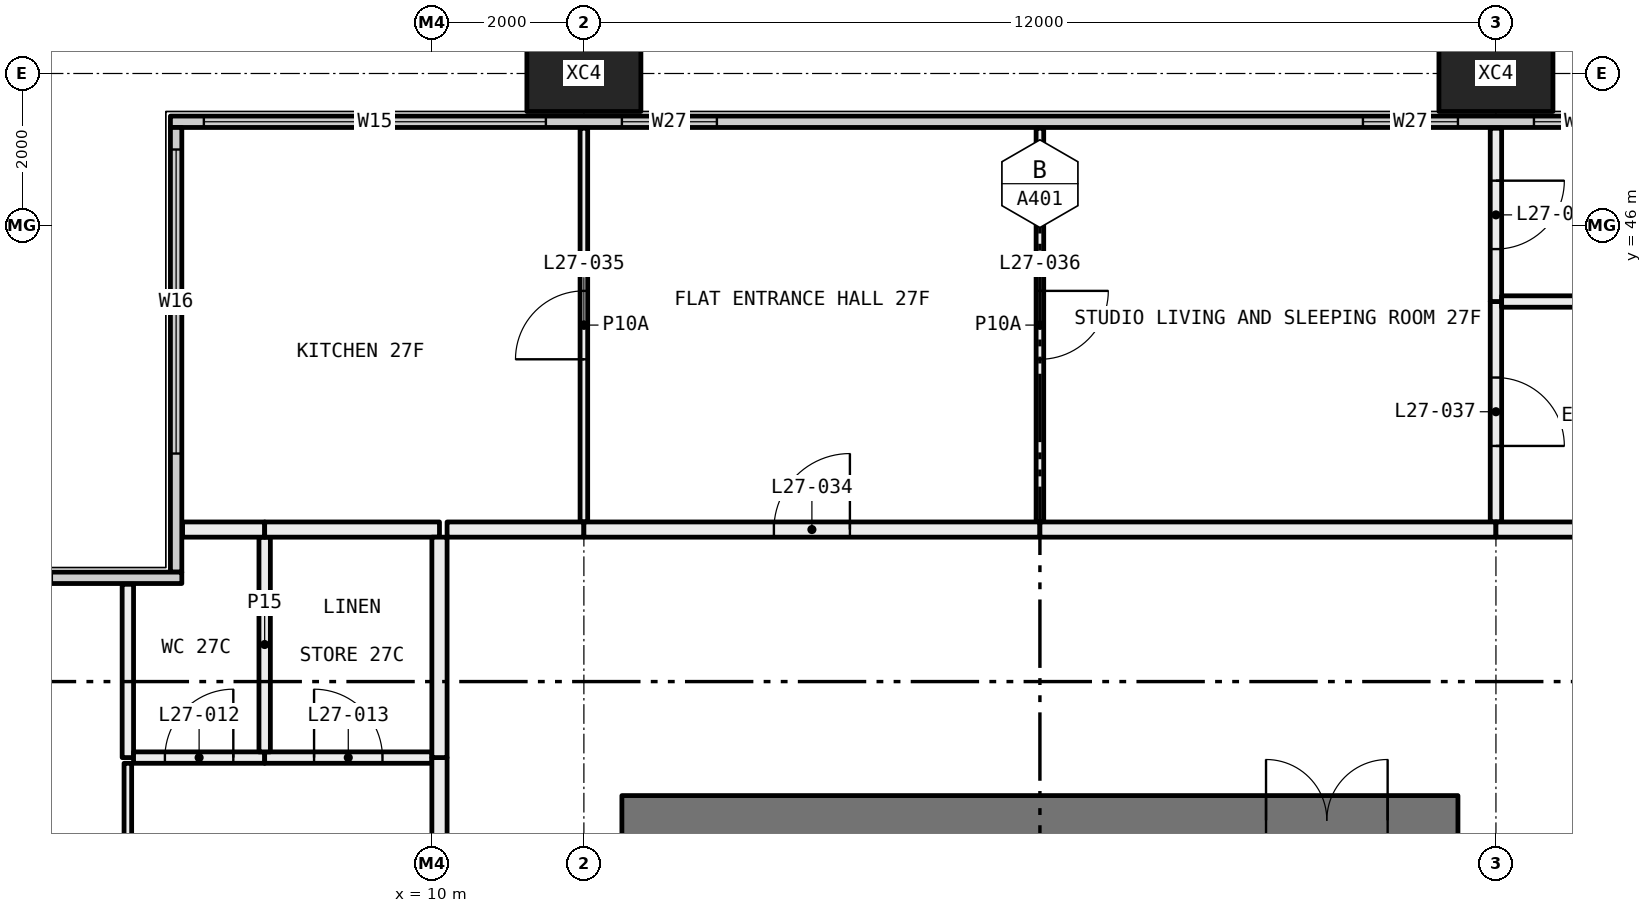
"""IFC4 building model, lengths in metres.
Left out: names, types, materials, properties, quantities, classifications, styles, units other than length and angle.
Written with IfcOpenShell. Run it as: python <this file> out.ifc"""

import sys

from ifc_helpers import new_model, si_unit, direction, frame, frame_2d, origin, origin_2d, place, context, subcontext, project, spatial, rectangle, hollow_rectangle, extrude, element, fill, save


model = new_model("IFC4")
c1 = context("Model", 3, precision=1e-05, world=origin(), true_north=direction((0.0, 1.0)))
c2 = subcontext(c1, "Body", "Model", "MODEL_VIEW")
j1 = project(units=[si_unit("LENGTHUNIT", "METRE"), si_unit("PLANEANGLEUNIT", "RADIAN")], contexts=[c1])
p1 = place(None, origin())
s1 = spatial("IfcSite", under=j1, at=p1, CompositionType="ELEMENT")
p2 = place(p1, origin())
s2 = spatial("IfcBuilding", under=s1, at=p2, CompositionType="ELEMENT")
p3 = place(p2, frame((0.0, 0.0, 106.95)))
s3 = spatial("IfcBuildingStorey", under=s2, at=p3, CompositionType="ELEMENT", Elevation=106.95)
for number, where, z_axis, x_axis in (
    (1, (12.0, 48.0, -0.4), (0.0, 0.0, 1.0), (1.0, 0.0, 0.0)),
    (2, (24.0, 48.0, -0.4), (0.0, 0.0, 1.0), (1.0, 0.0, 0.0)),
):
    element("IfcColumn", number, at=place(p3, frame(where, z_axis=z_axis, x_axis=x_axis)), inside=s3, PredefinedType="COLUMN", context=c2, shape_type="SweptSolid", body=[
        extrude(hollow_rectangle(XDim=1.5, YDim=1.0, WallThickness=0.06, at=origin_2d()), origin(), (0.0, 0.0, 1.0), 3.45),
    ])
p4 = place(p3, frame((6.56, 47.365, 0.0), z_axis=(0.0, 0.0, 1.0), x_axis=(1.0, 0.0, 0.0)))
e3 = element("IfcWall", 3, at=p4, inside=s3, PredefinedType="ELEMENTEDWALL", context=c2, shape_type="SweptSolid", body=[
    extrude(rectangle(XDim=58.88, YDim=0.15, at=frame_2d((29.44, 0.0))), origin(), (0.0, 0.0, 1.0), 3.05),
])
p5 = place(p4, frame((0.44, 0.0, 0.45)))
e4 = element("IfcOpeningElement", 4, at=p5, cuts=e3, PredefinedType="OPENING", context=c2, shape_type="SweptSolid", body=[
    extrude(rectangle(XDim=4.5, YDim=2.55, at=frame_2d((2.25, 1.275))), frame((0.0, 0.085, 0.0), z_axis=(0.0, -1.0, 0.0), x_axis=(1.0, 0.0, 0.0)), (0.0, 0.0, 1.0), 0.17),
])
p6 = place(p4, frame((5.94, 0.0, 0.45)))
e5 = element("IfcOpeningElement", 5, at=p6, cuts=e3, PredefinedType="OPENING", context=c2, shape_type="SweptSolid", body=[
    extrude(rectangle(XDim=1.25, YDim=2.55, at=frame_2d((0.625, 1.275))), frame((0.0, 0.085, 0.0), z_axis=(0.0, -1.0, 0.0), x_axis=(1.0, 0.0, 0.0)), (0.0, 0.0, 1.0), 0.17),
])
p7 = place(p4, frame((15.69, 0.0, 0.45)))
e6 = element("IfcOpeningElement", 6, at=p7, cuts=e3, PredefinedType="OPENING", context=c2, shape_type="SweptSolid", body=[
    extrude(rectangle(XDim=1.25, YDim=2.55, at=frame_2d((0.625, 1.275))), frame((0.0, 0.085, 0.0), z_axis=(0.0, -1.0, 0.0), x_axis=(1.0, 0.0, 0.0)), (0.0, 0.0, 1.0), 0.17),
])
p8 = place(p4, frame((17.94, 0.0, 0.45)))
e7 = element("IfcOpeningElement", 7, at=p8, cuts=e3, PredefinedType="OPENING", context=c2, shape_type="SweptSolid", body=[
    extrude(rectangle(XDim=1.25, YDim=2.55, at=frame_2d((0.625, 1.275))), frame((0.0, 0.085, 0.0), z_axis=(0.0, -1.0, 0.0), x_axis=(1.0, 0.0, 0.0)), (0.0, 0.0, 1.0), 0.17),
])
p9 = place(p4, frame((27.69, 0.0, 0.45)))
e8 = element("IfcOpeningElement", 8, at=p9, cuts=e3, PredefinedType="OPENING", context=c2, shape_type="SweptSolid", body=[
    extrude(rectangle(XDim=1.25, YDim=2.55, at=frame_2d((0.625, 1.275))), frame((0.0, 0.085, 0.0), z_axis=(0.0, -1.0, 0.0), x_axis=(1.0, 0.0, 0.0)), (0.0, 0.0, 1.0), 0.17),
])
p10 = place(p4, frame((29.94, 0.0, 0.45)))
e9 = element("IfcOpeningElement", 9, at=p10, cuts=e3, PredefinedType="OPENING", context=c2, shape_type="SweptSolid", body=[
    extrude(rectangle(XDim=1.25, YDim=2.55, at=frame_2d((0.625, 1.275))), frame((0.0, 0.085, 0.0), z_axis=(0.0, -1.0, 0.0), x_axis=(1.0, 0.0, 0.0)), (0.0, 0.0, 1.0), 0.17),
])
p11 = place(p4, frame((39.69, 0.0, 0.45)))
e10 = element("IfcOpeningElement", 10, at=p11, cuts=e3, PredefinedType="OPENING", context=c2, shape_type="SweptSolid", body=[
    extrude(rectangle(XDim=1.25, YDim=2.55, at=frame_2d((0.625, 1.275))), frame((0.0, 0.085, 0.0), z_axis=(0.0, -1.0, 0.0), x_axis=(1.0, 0.0, 0.0)), (0.0, 0.0, 1.0), 0.17),
])
p12 = place(p4, frame((41.94, 0.0, 0.45)))
e11 = element("IfcOpeningElement", 11, at=p12, cuts=e3, PredefinedType="OPENING", context=c2, shape_type="SweptSolid", body=[
    extrude(rectangle(XDim=1.25, YDim=2.55, at=frame_2d((0.625, 1.275))), frame((0.0, 0.085, 0.0), z_axis=(0.0, -1.0, 0.0), x_axis=(1.0, 0.0, 0.0)), (0.0, 0.0, 1.0), 0.17),
])
p13 = place(p4, frame((51.69, 0.0, 0.45)))
e12 = element("IfcOpeningElement", 12, at=p13, cuts=e3, PredefinedType="OPENING", context=c2, shape_type="SweptSolid", body=[
    extrude(rectangle(XDim=1.25, YDim=2.55, at=frame_2d((0.625, 1.275))), frame((0.0, 0.085, 0.0), z_axis=(0.0, -1.0, 0.0), x_axis=(1.0, 0.0, 0.0)), (0.0, 0.0, 1.0), 0.17),
])
p14 = place(p4, frame((53.94, 0.0, 0.45)))
e13 = element("IfcOpeningElement", 13, at=p14, cuts=e3, PredefinedType="OPENING", context=c2, shape_type="SweptSolid", body=[
    extrude(rectangle(XDim=4.5, YDim=2.55, at=frame_2d((2.25, 1.275))), frame((0.0, 0.085, 0.0), z_axis=(0.0, -1.0, 0.0), x_axis=(1.0, 0.0, 0.0)), (0.0, 0.0, 1.0), 0.17),
])
p15 = place(p3, frame((6.635, 41.44, 0.0), z_axis=(0.0, 0.0, 1.0), x_axis=(0.0, 1.0, 0.0)))
e14 = element("IfcWall", 14, at=p15, inside=s3, PredefinedType="ELEMENTEDWALL", context=c2, shape_type="SweptSolid", body=[
    extrude(rectangle(XDim=5.85, YDim=0.15, at=frame_2d((2.925, 0.0))), origin(), (0.0, 0.0, 1.0), 3.05),
])
p16 = place(p15, frame((1.56, 0.0, 0.45)))
e15 = element("IfcOpeningElement", 15, at=p16, cuts=e14, PredefinedType="OPENING", context=c2, shape_type="SweptSolid", body=[
    extrude(rectangle(XDim=4.0, YDim=2.55, at=frame_2d((2.0, 1.275))), frame((0.0, 0.085, 0.0), z_axis=(0.0, -1.0, 0.0), x_axis=(1.0, 0.0, 0.0)), (0.0, 0.0, 1.0), 0.17),
])
p17 = place(p3, frame((0.56, 41.365, 0.0), z_axis=(0.0, 0.0, 1.0), x_axis=(1.0, 0.0, 0.0)))
e16 = element("IfcWall", 16, at=p17, inside=s3, PredefinedType="ELEMENTEDWALL", context=c2, shape_type="SweptSolid", body=[
    extrude(rectangle(XDim=6.15, YDim=0.15, at=frame_2d((3.075, 0.0))), origin(), (0.0, 0.0, 1.0), 3.05),
])
p18 = place(p17, frame((0.44, 0.0, 0.45)))
e17 = element("IfcOpeningElement", 17, at=p18, cuts=e16, PredefinedType="OPENING", context=c2, shape_type="SweptSolid", body=[
    extrude(rectangle(XDim=4.0, YDim=2.55, at=frame_2d((2.0, 1.275))), frame((0.0, 0.085, 0.0), z_axis=(0.0, -1.0, 0.0), x_axis=(1.0, 0.0, 0.0)), (0.0, 0.0, 1.0), 0.17),
])
p19 = place(p3, frame((6.0, 36.05, 0.0), z_axis=(0.0, 0.0, 1.0), x_axis=(0.0, 1.0, 0.0)))
e18 = element("IfcWall", 18, at=p19, inside=s3, PredefinedType="PARTITIONING", context=c2, shape_type="SweptSolid", body=[
    extrude(rectangle(XDim=2.875, YDim=0.1, at=frame_2d((1.438, 0.0))), origin(), (0.0, 0.0, 1.0), 2.45),
])
p20 = place(p3, frame((6.0, 39.0, 0.0), z_axis=(0.0, 0.0, 1.0), x_axis=(0.0, 1.0, 0.0)))
e19 = element("IfcWall", 19, at=p20, inside=s3, PredefinedType="PARTITIONING", context=c2, shape_type="SweptSolid", body=[
    extrude(rectangle(XDim=2.28, YDim=0.15, at=frame_2d((1.14, 0.0))), origin(), (0.0, 0.0, 1.0), 3.05),
])
p21 = place(p3, frame((7.8, 39.0, 0.0), z_axis=(0.0, 0.0, 1.0), x_axis=(-1.0, 0.0, 0.0)))
e20 = element("IfcWall", 20, at=p21, inside=s3, PredefinedType="PARTITIONING", context=c2, shape_type="SweptSolid", body=[
    extrude(rectangle(XDim=1.725, YDim=0.15, at=frame_2d((0.863, 0.0))), origin(), (0.0, 0.0, 1.0), 3.05),
])
p22 = place(p21, frame((0.413, 0.0, 0.0)))
e21 = element("IfcOpeningElement", 21, at=p22, cuts=e20, PredefinedType="OPENING", context=c2, shape_type="SweptSolid", body=[
    extrude(rectangle(XDim=0.9, YDim=2.1, at=frame_2d((0.45, 1.05))), frame((0.0, 0.085, 0.0), z_axis=(0.0, -1.0, 0.0), x_axis=(1.0, 0.0, 0.0)), (0.0, 0.0, 1.0), 0.17),
])
p23 = place(p3, frame((10.0, 39.0, 0.0), z_axis=(0.0, 0.0, 1.0), x_axis=(-1.0, 0.0, 0.0)))
e22 = element("IfcWall", 22, at=p23, inside=s3, PredefinedType="PARTITIONING", context=c2, shape_type="SweptSolid", body=[
    extrude(rectangle(XDim=2.2, YDim=0.15, at=frame_2d((1.1, 0.0))), origin(), (0.0, 0.0, 1.0), 3.05),
])
p24 = place(p23, frame((0.65, 0.0, 0.0)))
e23 = element("IfcOpeningElement", 23, at=p24, cuts=e22, PredefinedType="OPENING", context=c2, shape_type="SweptSolid", body=[
    extrude(rectangle(XDim=0.9, YDim=2.1, at=frame_2d((0.45, 1.05))), frame((0.0, 0.085, 0.0), z_axis=(0.0, -1.0, 0.0), x_axis=(1.0, 0.0, 0.0)), (0.0, 0.0, 1.0), 0.17),
])
p25 = place(p3, frame((10.1, 36.1, 0.0), z_axis=(0.0, 0.0, 1.0), x_axis=(0.0, 1.0, 0.0)))
e24 = element("IfcWall", 24, at=p25, inside=s3, PredefinedType="PARTITIONING", context=c2, shape_type="SweptSolid", body=[
    extrude(rectangle(XDim=2.9, YDim=0.2, at=frame_2d((1.45, 0.0))), origin(), (0.0, 0.0, 1.0), 3.05),
])
p26 = place(p3, frame((7.8, 39.075, 0.0), z_axis=(0.0, 0.0, 1.0), x_axis=(0.0, 1.0, 0.0)))
e25 = element("IfcWall", 25, at=p26, inside=s3, PredefinedType="PARTITIONING", context=c2, shape_type="SweptSolid", body=[
    extrude(rectangle(XDim=2.825, YDim=0.15, at=frame_2d((1.413, 0.0))), origin(), (0.0, 0.0, 1.0), 3.05),
])
p27 = place(p3, frame((7.8, 42.0, 0.0), z_axis=(0.0, 0.0, 1.0), x_axis=(-1.0, 0.0, 0.0)))
e26 = element("IfcWall", 26, at=p27, inside=s3, PredefinedType="PARTITIONING", context=c2, shape_type="SweptSolid", body=[
    extrude(rectangle(XDim=1.08, YDim=0.2, at=frame_2d((0.54, 0.0))), origin(), (0.0, 0.0, 1.0), 3.05),
])
p28 = place(p3, frame((10.1, 42.0, 0.0), z_axis=(0.0, 0.0, 1.0), x_axis=(-1.0, 0.0, 0.0)))
e27 = element("IfcWall", 27, at=p28, inside=s3, PredefinedType="PARTITIONING", context=c2, shape_type="SweptSolid", body=[
    extrude(rectangle(XDim=2.3, YDim=0.2, at=frame_2d((1.15, 0.0))), origin(), (0.0, 0.0, 1.0), 3.05),
])
p29 = place(p3, frame((10.1, 39.0, 0.0), z_axis=(0.0, 0.0, 1.0), x_axis=(0.0, 1.0, 0.0)))
e28 = element("IfcWall", 28, at=p29, inside=s3, PredefinedType="PARTITIONING", context=c2, shape_type="SweptSolid", body=[
    extrude(rectangle(XDim=2.9, YDim=0.2, at=frame_2d((1.45, 0.0))), origin(), (0.0, 0.0, 1.0), 3.05),
])
p30 = place(p3, frame((12.0, 42.1, 0.0), z_axis=(0.0, 0.0, 1.0), x_axis=(0.0, 1.0, 0.0)))
e29 = element("IfcWall", 29, at=p30, inside=s3, PredefinedType="PARTITIONING", context=c2, shape_type="SweptSolid", body=[
    extrude(rectangle(XDim=5.18, YDim=0.1, at=frame_2d((2.59, 0.0))), origin(), (0.0, 0.0, 1.0), 3.05),
])
p31 = place(p30, frame((2.14, 0.0, 0.0)))
e30 = element("IfcOpeningElement", 30, at=p31, cuts=e29, PredefinedType="OPENING", context=c2, shape_type="SweptSolid", body=[
    extrude(rectangle(XDim=0.9, YDim=2.1, at=frame_2d((0.45, 1.05))), frame((0.0, 0.06, 0.0), z_axis=(0.0, -1.0, 0.0), x_axis=(1.0, 0.0, 0.0)), (0.0, 0.0, 1.0), 0.12),
])
p32 = place(p3, frame((10.2, 42.0, 0.0), z_axis=(0.0, 0.0, 1.0), x_axis=(1.0, 0.0, 0.0)))
e31 = element("IfcWall", 31, at=p32, inside=s3, PredefinedType="PARTITIONING", context=c2, shape_type="SweptSolid", body=[
    extrude(rectangle(XDim=1.8, YDim=0.2, at=frame_2d((0.9, 0.0))), origin(), (0.0, 0.0, 1.0), 3.05),
])
p33 = place(p3, frame((18.0, 42.1, 0.0), z_axis=(0.0, 0.0, 1.0), x_axis=(0.0, 1.0, 0.0)))
e32 = element("IfcWall", 32, at=p33, inside=s3, PredefinedType="PARTITIONING", context=c2, shape_type="SweptSolid", body=[
    extrude(rectangle(XDim=5.18, YDim=0.1, at=frame_2d((2.59, 0.0))), origin(), (0.0, 0.0, 1.0), 3.05),
])
p34 = place(p33, frame((2.14, 0.0, 0.0)))
e33 = element("IfcOpeningElement", 33, at=p34, cuts=e32, PredefinedType="OPENING", context=c2, shape_type="SweptSolid", body=[
    extrude(rectangle(XDim=0.9, YDim=2.1, at=frame_2d((0.45, 1.05))), frame((0.0, 0.06, 0.0), z_axis=(0.0, -1.0, 0.0), x_axis=(1.0, 0.0, 0.0)), (0.0, 0.0, 1.0), 0.12),
])
p35 = place(p3, frame((12.0, 42.0, 0.0), z_axis=(0.0, 0.0, 1.0), x_axis=(1.0, 0.0, 0.0)))
e34 = element("IfcWall", 34, at=p35, inside=s3, PredefinedType="PARTITIONING", context=c2, shape_type="SweptSolid", body=[
    extrude(rectangle(XDim=6.0, YDim=0.2, at=frame_2d((3.0, 0.0))), origin(), (0.0, 0.0, 1.0), 3.05),
])
p36 = place(p35, frame((2.5, 0.0, 0.0)))
e35 = element("IfcOpeningElement", 35, at=p36, cuts=e34, PredefinedType="OPENING", context=c2, shape_type="SweptSolid", body=[
    extrude(rectangle(XDim=1.0, YDim=2.1, at=frame_2d((0.5, 1.05))), frame((0.0, 0.11, 0.0), z_axis=(0.0, -1.0, 0.0), x_axis=(1.0, 0.0, 0.0)), (0.0, 0.0, 1.0), 0.22),
])
p37 = place(p3, frame((24.0, 42.1, 0.0), z_axis=(0.0, 0.0, 1.0), x_axis=(0.0, 1.0, 0.0)))
e36 = element("IfcWall", 36, at=p37, inside=s3, PredefinedType="PARTITIONING", context=c2, shape_type="SweptSolid", body=[
    extrude(rectangle(XDim=2.9, YDim=0.15, at=frame_2d((1.45, 0.0))), origin(), (0.0, 0.0, 1.0), 3.05),
])
p38 = place(p37, frame((1.0, 0.0, 0.0)))
e37 = element("IfcOpeningElement", 37, at=p38, cuts=e36, PredefinedType="OPENING", context=c2, shape_type="SweptSolid", body=[
    extrude(rectangle(XDim=0.9, YDim=2.1, at=frame_2d((0.45, 1.05))), frame((0.0, 0.085, 0.0), z_axis=(0.0, -1.0, 0.0), x_axis=(1.0, 0.0, 0.0)), (0.0, 0.0, 1.0), 0.17),
])
p39 = place(p3, frame((24.0, 45.0, 0.0), z_axis=(0.0, 0.0, 1.0), x_axis=(0.0, 1.0, 0.0)))
e38 = element("IfcWall", 38, at=p39, inside=s3, PredefinedType="PARTITIONING", context=c2, shape_type="SweptSolid", body=[
    extrude(rectangle(XDim=2.28, YDim=0.15, at=frame_2d((1.14, 0.0))), origin(), (0.0, 0.0, 1.0), 3.05),
])
p40 = place(p39, frame((0.69, 0.0, 0.0)))
e39 = element("IfcOpeningElement", 39, at=p40, cuts=e38, PredefinedType="OPENING", context=c2, shape_type="SweptSolid", body=[
    extrude(rectangle(XDim=0.9, YDim=2.1, at=frame_2d((0.45, 1.05))), frame((0.0, 0.085, 0.0), z_axis=(0.0, -1.0, 0.0), x_axis=(1.0, 0.0, 0.0)), (0.0, 0.0, 1.0), 0.17),
])
p41 = place(p3, frame((18.0, 42.0, 0.0), z_axis=(0.0, 0.0, 1.0), x_axis=(1.0, 0.0, 0.0)))
e40 = element("IfcWall", 40, at=p41, inside=s3, PredefinedType="PARTITIONING", context=c2, shape_type="SweptSolid", body=[
    extrude(rectangle(XDim=6.0, YDim=0.2, at=frame_2d((3.0, 0.0))), origin(), (0.0, 0.0, 1.0), 3.05),
])
p42 = place(p3, frame((29.9, 45.0, 0.0), z_axis=(0.0, 0.0, 1.0), x_axis=(-1.0, 0.0, 0.0)))
e41 = element("IfcWall", 41, at=p42, inside=s3, PredefinedType="PARTITIONING", context=c2, shape_type="SweptSolid", body=[
    extrude(rectangle(XDim=5.825, YDim=0.15, at=frame_2d((2.913, 0.0))), origin(), (0.0, 0.0, 1.0), 3.05),
])
p43 = place(p3, frame((24.0, 42.0, 0.0), z_axis=(0.0, 0.0, 1.0), x_axis=(1.0, 0.0, 0.0)))
e42 = element("IfcWall", 42, at=p43, inside=s3, PredefinedType="PARTITIONING", context=c2, shape_type="SweptSolid", body=[
    extrude(rectangle(XDim=1.9, YDim=0.2, at=frame_2d((0.95, 0.0))), origin(), (0.0, 0.0, 1.0), 3.05),
])
p44 = place(p3, frame((12.5, 38.175, 0.0), z_axis=(0.0, 0.0, 1.0), x_axis=(1.0, 0.0, 0.0)))
e43 = element("IfcWall", 43, at=p44, inside=s3, PredefinedType="SHEAR", context=c2, shape_type="SweptSolid", body=[
    extrude(rectangle(XDim=11.0, YDim=0.65, at=frame_2d((5.5, 0.0))), origin(), (0.0, 0.0, 1.0), 3.05),
])
p45 = place(p44, frame((8.475, 0.0, 0.0)))
e44 = element("IfcOpeningElement", 44, at=p45, cuts=e43, PredefinedType="OPENING", context=c2, shape_type="SweptSolid", body=[
    extrude(rectangle(XDim=1.6, YDim=2.1, at=frame_2d((0.8, 1.05))), frame((0.0, 0.335, 0.0), z_axis=(0.0, -1.0, 0.0), x_axis=(1.0, 0.0, 0.0)), (0.0, 0.0, 1.0), 0.67),
])
p46 = place(p5, origin())
e45 = element("IfcWindow", 45, at=p46, inside=s3, PartitioningType="SINGLE_PANEL", PredefinedType="WINDOW", context=c2, shape_type="SweptSolid", body=[
    extrude(rectangle(XDim=4.5, YDim=2.55, at=frame_2d((2.25, 1.275))), frame((0.0, 0.03, 0.0), z_axis=(0.0, -1.0, 0.0), x_axis=(1.0, 0.0, 0.0)), (0.0, 0.0, 1.0), 0.06),
])
fill(e4, e45)
p47 = place(p6, origin())
e46 = element("IfcWindow", 46, at=p47, inside=s3, PartitioningType="SINGLE_PANEL", PredefinedType="WINDOW", context=c2, shape_type="SweptSolid", body=[
    extrude(rectangle(XDim=1.25, YDim=2.55, at=frame_2d((0.625, 1.275))), frame((0.0, 0.03, 0.0), z_axis=(0.0, -1.0, 0.0), x_axis=(1.0, 0.0, 0.0)), (0.0, 0.0, 1.0), 0.06),
])
fill(e5, e46)
p48 = place(p7, origin())
e47 = element("IfcWindow", 47, at=p48, inside=s3, PartitioningType="SINGLE_PANEL", PredefinedType="WINDOW", context=c2, shape_type="SweptSolid", body=[
    extrude(rectangle(XDim=1.25, YDim=2.55, at=frame_2d((0.625, 1.275))), frame((0.0, 0.03, 0.0), z_axis=(0.0, -1.0, 0.0), x_axis=(1.0, 0.0, 0.0)), (0.0, 0.0, 1.0), 0.06),
])
fill(e6, e47)
p49 = place(p8, origin())
e48 = element("IfcWindow", 48, at=p49, inside=s3, PartitioningType="SINGLE_PANEL", PredefinedType="WINDOW", context=c2, shape_type="SweptSolid", body=[
    extrude(rectangle(XDim=1.25, YDim=2.55, at=frame_2d((0.625, 1.275))), frame((0.0, 0.03, 0.0), z_axis=(0.0, -1.0, 0.0), x_axis=(1.0, 0.0, 0.0)), (0.0, 0.0, 1.0), 0.06),
])
fill(e7, e48)
p50 = place(p16, origin())
e49 = element("IfcWindow", 49, at=p50, inside=s3, PartitioningType="SINGLE_PANEL", PredefinedType="WINDOW", context=c2, shape_type="SweptSolid", body=[
    extrude(rectangle(XDim=4.0, YDim=2.55, at=frame_2d((2.0, 1.275))), frame((0.0, 0.03, 0.0), z_axis=(0.0, -1.0, 0.0), x_axis=(1.0, 0.0, 0.0)), (0.0, 0.0, 1.0), 0.06),
])
fill(e15, e49)
p51 = place(p22, frame((0.9, 0.0, 0.0), x_axis=(-1.0, 0.0, 0.0)))
e50 = element("IfcDoor", 50, at=p51, inside=s3, OperationType="SINGLE_SWING_LEFT", PredefinedType="DOOR", context=c2, shape_type="SweptSolid", body=[
    extrude(rectangle(XDim=0.9, YDim=2.1, at=frame_2d((0.45, 1.05))), frame((0.0, 0.025, 0.0), z_axis=(0.0, -1.0, 0.0), x_axis=(1.0, 0.0, 0.0)), (0.0, 0.0, 1.0), 0.05),
])
fill(e21, e50)
p52 = place(p24, frame((0.9, 0.0, 0.0), x_axis=(-1.0, 0.0, 0.0)))
e51 = element("IfcDoor", 51, at=p52, inside=s3, OperationType="SINGLE_SWING_RIGHT", PredefinedType="DOOR", context=c2, shape_type="SweptSolid", body=[
    extrude(rectangle(XDim=0.9, YDim=2.1, at=frame_2d((0.45, 1.05))), frame((0.0, 0.025, 0.0), z_axis=(0.0, -1.0, 0.0), x_axis=(1.0, 0.0, 0.0)), (0.0, 0.0, 1.0), 0.05),
])
fill(e23, e51)
p53 = place(p36, origin())
e52 = element("IfcDoor", 52, at=p53, inside=s3, OperationType="SINGLE_SWING_LEFT", PredefinedType="DOOR", context=c2, shape_type="SweptSolid", body=[
    extrude(rectangle(XDim=1.0, YDim=2.1, at=frame_2d((0.5, 1.05))), frame((0.0, 0.025, 0.0), z_axis=(0.0, -1.0, 0.0), x_axis=(1.0, 0.0, 0.0)), (0.0, 0.0, 1.0), 0.05),
])
fill(e35, e52)
p54 = place(p31, origin())
e53 = element("IfcDoor", 53, at=p54, inside=s3, OperationType="SINGLE_SWING_RIGHT", PredefinedType="DOOR", context=c2, shape_type="SweptSolid", body=[
    extrude(rectangle(XDim=0.9, YDim=2.1, at=frame_2d((0.45, 1.05))), frame((0.0, 0.025, 0.0), z_axis=(0.0, -1.0, 0.0), x_axis=(1.0, 0.0, 0.0)), (0.0, 0.0, 1.0), 0.05),
])
fill(e30, e53)
p55 = place(p34, frame((0.9, 0.0, 0.0), x_axis=(-1.0, 0.0, 0.0)))
e54 = element("IfcDoor", 54, at=p55, inside=s3, OperationType="SINGLE_SWING_RIGHT", PredefinedType="DOOR", context=c2, shape_type="SweptSolid", body=[
    extrude(rectangle(XDim=0.9, YDim=2.1, at=frame_2d((0.45, 1.05))), frame((0.0, 0.025, 0.0), z_axis=(0.0, -1.0, 0.0), x_axis=(1.0, 0.0, 0.0)), (0.0, 0.0, 1.0), 0.05),
])
fill(e33, e54)
p56 = place(p38, frame((0.9, 0.0, 0.0), x_axis=(-1.0, 0.0, 0.0)))
e55 = element("IfcDoor", 55, at=p56, inside=s3, OperationType="SINGLE_SWING_LEFT", PredefinedType="DOOR", context=c2, shape_type="SweptSolid", body=[
    extrude(rectangle(XDim=0.9, YDim=2.1, at=frame_2d((0.45, 1.05))), frame((0.0, 0.025, 0.0), z_axis=(0.0, -1.0, 0.0), x_axis=(1.0, 0.0, 0.0)), (0.0, 0.0, 1.0), 0.05),
])
fill(e37, e55)
p57 = place(p40, frame((0.9, 0.0, 0.0), x_axis=(-1.0, 0.0, 0.0)))
e56 = element("IfcDoor", 56, at=p57, inside=s3, OperationType="SINGLE_SWING_RIGHT", PredefinedType="DOOR", context=c2, shape_type="SweptSolid", body=[
    extrude(rectangle(XDim=0.9, YDim=2.1, at=frame_2d((0.45, 1.05))), frame((0.0, 0.025, 0.0), z_axis=(0.0, -1.0, 0.0), x_axis=(1.0, 0.0, 0.0)), (0.0, 0.0, 1.0), 0.05),
])
fill(e39, e56)
p58 = place(p45, origin())
e57 = element("IfcDoor", 57, at=p58, inside=s3, OperationType="DOUBLE_DOOR_SINGLE_SWING", PredefinedType="DOOR", context=c2, shape_type="SweptSolid", body=[
    extrude(rectangle(XDim=1.6, YDim=2.1, at=frame_2d((0.8, 1.05))), frame((0.0, 0.025, 0.0), z_axis=(0.0, -1.0, 0.0), x_axis=(1.0, 0.0, 0.0)), (0.0, 0.0, 1.0), 0.05),
])
fill(e44, e57)
save(model, sys.argv[1])
